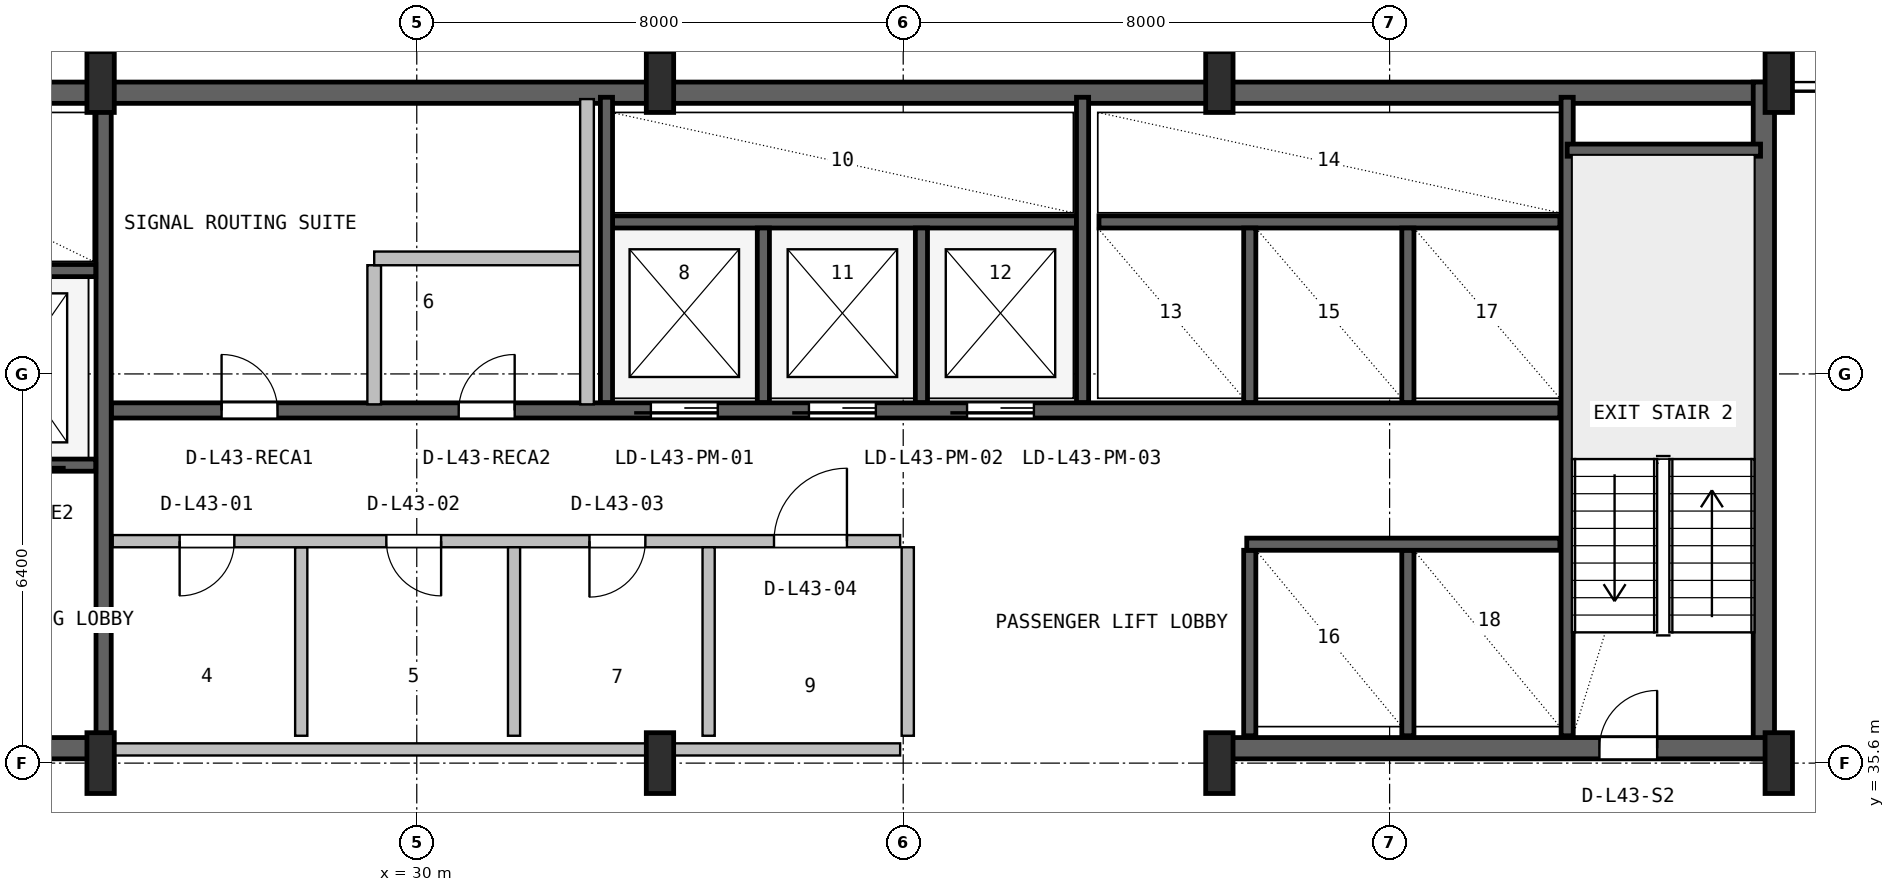
"""IFC4 building model, lengths in metres.
Left out: names, types, materials, properties, quantities, classifications, styles, units other than length and angle.
Written with IfcOpenShell. Run it as: python <this file> out.ifc"""

import sys

from ifc_helpers import new_model, si_unit, direction, frame, frame_2d, origin, origin_2d, place, context, subcontext, project, spatial, rectangle, i_section, extrude, source, transform, mapped, element, fill, save


model = new_model("IFC4")
c1 = context("Model", 3, precision=1e-05, world=origin(), true_north=direction((0.0, 1.0)))
c2 = subcontext(c1, "Body", "Model", "MODEL_VIEW")
j1 = project(units=[si_unit("LENGTHUNIT", "METRE"), si_unit("PLANEANGLEUNIT", "RADIAN")], contexts=[c1])
p1 = place(None, origin())
s1 = spatial("IfcSite", under=j1, at=p1, CompositionType="ELEMENT")
p2 = place(p1, origin())
s2 = spatial("IfcBuilding", under=s1, at=p2, CompositionType="ELEMENT")
p3 = place(p2, frame((0.0, 0.0, 176.2)))
s3 = spatial("IfcBuildingStorey", under=s2, at=p3, CompositionType="ELEMENT", Elevation=176.2)
p4 = place(p3, frame((15.6, 46.625, 0.0), z_axis=(0.0, 0.0, 1.0), x_axis=(1.0, 0.0, 0.0)))
e1 = element("IfcWall", 1, at=p4, inside=s3, PredefinedType="SHEAR", context=c2, shape_type="SweptSolid", body=[
    extrude(rectangle(XDim=36.8, YDim=0.35, at=frame_2d((18.4, 0.0))), origin(), (0.0, 0.0, 1.0), 3.55),
])
p5 = place(p3, frame((52.155, 35.67, 0.0), z_axis=(0.0, 0.0, 1.0), x_axis=(0.0, 1.0, 0.0)))
e2 = element("IfcWall", 2, at=p5, inside=s3, PredefinedType="SHEAR", context=c2, shape_type="SweptSolid", body=[
    extrude(rectangle(XDim=11.13, YDim=0.35, at=frame_2d((5.565, 0.0))), origin(), (0.0, 0.0, 1.0), 3.55),
])
p6 = place(p3, frame((15.67, 35.845, 0.0), z_axis=(0.0, 0.0, 1.0), x_axis=(1.0, 0.0, 0.0)))
e3 = element("IfcWall", 3, at=p6, inside=s3, PredefinedType="SHEAR", context=c2, shape_type="SweptSolid", body=[
    extrude(rectangle(XDim=9.13, YDim=0.35, at=frame_2d((4.565, 0.0))), origin(), (0.0, 0.0, 1.0), 3.55),
])
p7 = place(p6, frame((5.4, 0.0, 0.0)))
e4 = element("IfcOpeningElement", 4, at=p7, cuts=e3, PredefinedType="OPENING", context=c2, shape_type="SweptSolid", body=[
    extrude(rectangle(XDim=1.0, YDim=2.1, at=frame_2d((0.5, 1.05))), frame((0.0, 0.185, 0.0), z_axis=(0.0, -1.0, 0.0), x_axis=(1.0, 0.0, 0.0)), (0.0, 0.0, 1.0), 0.37),
])
p8 = place(p3, frame((43.2, 35.845, 0.0), z_axis=(0.0, 0.0, 1.0), x_axis=(1.0, 0.0, 0.0)))
e5 = element("IfcWall", 5, at=p8, inside=s3, PredefinedType="SHEAR", context=c2, shape_type="SweptSolid", body=[
    extrude(rectangle(XDim=9.13, YDim=0.35, at=frame_2d((4.565, 0.0))), origin(), (0.0, 0.0, 1.0), 3.55),
])
p9 = place(p8, frame((6.25, 0.0, 0.0)))
e6 = element("IfcOpeningElement", 6, at=p9, cuts=e5, PredefinedType="OPENING", context=c2, shape_type="SweptSolid", body=[
    extrude(rectangle(XDim=0.95, YDim=2.1, at=frame_2d((0.475, 1.05))), frame((0.0, 0.185, 0.0), z_axis=(0.0, -1.0, 0.0), x_axis=(1.0, 0.0, 0.0)), (0.0, 0.0, 1.0), 0.37),
])
m1 = source(origin(), c2, "Body", "SweptSolid", [
    extrude(i_section(OverallWidth=0.45, OverallDepth=1.0, WebThickness=0.016, FlangeThickness=0.03, FilletRadius=0.016, at=origin_2d()), origin(), (0.0, 0.0, 1.0), 3.8),
])
for number, where, z_axis, x_axis in (
    (7, (24.8, 35.6, 0.0), (0.0, 0.0, 1.0), (1.0, 0.0, 0.0)),
    (8, (24.8, 46.8, 0.0), (0.0, 0.0, 1.0), (1.0, 0.0, 0.0)),
    (9, (34.0, 35.6, 0.0), (0.0, 0.0, 1.0), (1.0, 0.0, 0.0)),
    (10, (34.0, 46.8, 0.0), (0.0, 0.0, 1.0), (1.0, 0.0, 0.0)),
    (11, (43.2, 35.6, 0.0), (0.0, 0.0, 1.0), (1.0, 0.0, 0.0)),
    (12, (43.2, 46.8, 0.0), (0.0, 0.0, 1.0), (1.0, 0.0, 0.0)),
    (13, (52.4, 35.6, 0.0), (0.0, 0.0, 1.0), (1.0, 0.0, 0.0)),
    (14, (52.4, 46.8, 0.0), (0.0, 0.0, 1.0), (1.0, 0.0, 0.0)),
):
    element("IfcColumn", number, at=place(p3, frame(where, z_axis=z_axis, x_axis=x_axis)), inside=s3, PredefinedType="COLUMN", context=c2, shape_type="MappedRepresentation", body=[
        mapped(m1, transform((0.0, 0.0, 0.0), x_axis=(1.0, 0.0, 0.0), y_axis=(0.0, 1.0, 0.0), z_axis=(0.0, 0.0, 1.0), scale=1.0)),
    ])
p10 = place(p3, frame((24.85, 36.05, 0.0), z_axis=(0.0, 0.0, 1.0), x_axis=(0.0, 1.0, 0.0)))
e15 = element("IfcWall", 15, at=p10, inside=s3, PredefinedType="SHEAR", context=c2, shape_type="SweptSolid", body=[
    extrude(rectangle(XDim=10.45, YDim=0.25, at=frame_2d((5.225, 0.0))), origin(), (0.0, 0.0, 1.0), 3.55),
])
p11 = place(p3, frame((19.2, 40.5, 0.0), z_axis=(0.0, 0.0, 1.0), x_axis=(1.0, 0.0, 0.0)))
e16 = element("IfcWall", 16, at=p11, inside=s3, PredefinedType="SHEAR", context=c2, shape_type="SweptSolid", body=[
    extrude(rectangle(XDim=5.52, YDim=0.2, at=frame_2d((2.76, 0.0))), origin(), (0.0, 0.0, 1.0), 3.55),
])
p12 = place(p11, frame((1.05, 0.0, 0.0)))
e17 = element("IfcOpeningElement", 17, at=p12, cuts=e16, PredefinedType="OPENING", context=c2, shape_type="SweptSolid", body=[
    extrude(rectangle(XDim=1.1, YDim=2.18, at=frame_2d((0.55, 1.09))), frame((0.0, 0.11, 0.0), z_axis=(0.0, -1.0, 0.0), x_axis=(1.0, 0.0, 0.0)), (0.0, 0.0, 1.0), 0.22),
])
p13 = place(p11, frame((3.65, 0.0, 0.0)))
e18 = element("IfcOpeningElement", 18, at=p13, cuts=e16, PredefinedType="OPENING", context=c2, shape_type="SweptSolid", body=[
    extrude(rectangle(XDim=1.1, YDim=2.18, at=frame_2d((0.55, 1.09))), frame((0.0, 0.11, 0.0), z_axis=(0.0, -1.0, 0.0), x_axis=(1.0, 0.0, 0.0)), (0.0, 0.0, 1.0), 0.22),
])
p14 = place(p3, frame((19.2, 43.7, 0.0), z_axis=(0.0, 0.0, 1.0), x_axis=(1.0, 0.0, 0.0)))
e19 = element("IfcWall", 19, at=p14, inside=s3, PredefinedType="SHEAR", context=c2, shape_type="SweptSolid", body=[
    extrude(rectangle(XDim=5.52, YDim=0.2, at=frame_2d((2.76, 0.0))), origin(), (0.0, 0.0, 1.0), 3.55),
])
p15 = place(p3, frame((48.92, 36.05, 0.0), z_axis=(0.0, 0.0, 1.0), x_axis=(0.0, 1.0, 0.0)))
e20 = element("IfcWall", 20, at=p15, inside=s3, PredefinedType="SHEAR", context=c2, shape_type="SweptSolid", body=[
    extrude(rectangle(XDim=10.5, YDim=0.2, at=frame_2d((5.25, 0.0))), origin(), (0.0, 0.0, 1.0), 3.55),
])
p16 = place(p3, frame((48.92, 45.68, 0.0), z_axis=(0.0, 0.0, 1.0), x_axis=(1.0, 0.0, 0.0)))
e21 = element("IfcWall", 21, at=p16, inside=s3, PredefinedType="SHEAR", context=c2, shape_type="SweptSolid", body=[
    extrude(rectangle(XDim=3.18, YDim=0.2, at=frame_2d((1.59, 0.0))), origin(), (0.0, 0.0, 1.0), 3.55),
])
p17 = place(p3, frame((24.98, 41.4, 0.0), z_axis=(0.0, 0.0, 1.0), x_axis=(1.0, 0.0, 0.0)))
e22 = element("IfcWall", 22, at=p17, inside=s3, PredefinedType="SHEAR", context=c2, shape_type="SweptSolid", body=[
    extrude(rectangle(XDim=23.82, YDim=0.25, at=frame_2d((11.91, 0.0))), origin(), (0.0, 0.0, 1.0), 3.55),
])
p18 = place(p17, frame((8.87, 0.0, 0.0)))
e23 = element("IfcOpeningElement", 23, at=p18, cuts=e22, PredefinedType="OPENING", context=c2, shape_type="SweptSolid", body=[
    extrude(rectangle(XDim=1.1, YDim=2.18, at=frame_2d((0.55, 1.09))), frame((0.0, 0.135, 0.0), z_axis=(0.0, -1.0, 0.0), x_axis=(1.0, 0.0, 0.0)), (0.0, 0.0, 1.0), 0.27),
])
p19 = place(p17, frame((11.47, 0.0, 0.0)))
e24 = element("IfcOpeningElement", 24, at=p19, cuts=e22, PredefinedType="OPENING", context=c2, shape_type="SweptSolid", body=[
    extrude(rectangle(XDim=1.1, YDim=2.18, at=frame_2d((0.55, 1.09))), frame((0.0, 0.135, 0.0), z_axis=(0.0, -1.0, 0.0), x_axis=(1.0, 0.0, 0.0)), (0.0, 0.0, 1.0), 0.27),
])
p20 = place(p17, frame((14.07, 0.0, 0.0)))
e25 = element("IfcOpeningElement", 25, at=p20, cuts=e22, PredefinedType="OPENING", context=c2, shape_type="SweptSolid", body=[
    extrude(rectangle(XDim=1.1, YDim=2.18, at=frame_2d((0.55, 1.09))), frame((0.0, 0.135, 0.0), z_axis=(0.0, -1.0, 0.0), x_axis=(1.0, 0.0, 0.0)), (0.0, 0.0, 1.0), 0.27),
])
p21 = place(p17, frame((1.81, 0.0, 0.0)))
e26 = element("IfcOpeningElement", 26, at=p21, cuts=e22, PredefinedType="OPENING", context=c2, shape_type="SweptSolid", body=[
    extrude(rectangle(XDim=0.92, YDim=2.08, at=frame_2d((0.46, 1.04))), frame((0.0, 0.135, 0.0), z_axis=(0.0, -1.0, 0.0), x_axis=(1.0, 0.0, 0.0)), (0.0, 0.0, 1.0), 0.27),
])
p22 = place(p17, frame((5.71, 0.0, 0.0)))
e27 = element("IfcOpeningElement", 27, at=p22, cuts=e22, PredefinedType="OPENING", context=c2, shape_type="SweptSolid", body=[
    extrude(rectangle(XDim=0.92, YDim=2.08, at=frame_2d((0.46, 1.04))), frame((0.0, 0.135, 0.0), z_axis=(0.0, -1.0, 0.0), x_axis=(1.0, 0.0, 0.0)), (0.0, 0.0, 1.0), 0.27),
])
p23 = place(p3, frame((33.22, 44.5, 0.0), z_axis=(0.0, 0.0, 1.0), x_axis=(1.0, 0.0, 0.0)))
e28 = element("IfcWall", 28, at=p23, inside=s3, PredefinedType="SHEAR", context=c2, shape_type="SweptSolid", body=[
    extrude(rectangle(XDim=7.63, YDim=0.2, at=frame_2d((3.815, 0.0))), origin(), (0.0, 0.0, 1.0), 3.55),
])
p24 = place(p3, frame((33.12, 41.53, 0.0), z_axis=(0.0, 0.0, 1.0), x_axis=(0.0, 1.0, 0.0)))
e29 = element("IfcWall", 29, at=p24, inside=s3, PredefinedType="SHEAR", context=c2, shape_type="SweptSolid", body=[
    extrude(rectangle(XDim=5.02, YDim=0.2, at=frame_2d((2.51, 0.0))), origin(), (0.0, 0.0, 1.0), 3.55),
])
for number, where, z_axis, x_axis in (
    (30, (35.7, 41.53, 0.0), (0.0, 0.0, 1.0), (0.0, 1.0, 0.0)),
    (31, (38.3, 41.53, 0.0), (0.0, 0.0, 1.0), (0.0, 1.0, 0.0)),
):
    element("IfcWall", number, at=place(p3, frame(where, z_axis=z_axis, x_axis=x_axis)), inside=s3, PredefinedType="SHEAR", context=c2, shape_type="SweptSolid", body=[
        extrude(rectangle(XDim=2.87, YDim=0.2, at=frame_2d((1.435, 0.0))), origin(), (0.0, 0.0, 1.0), 3.55),
    ])
p25 = place(p3, frame((40.95, 41.53, 0.0), z_axis=(0.0, 0.0, 1.0), x_axis=(0.0, 1.0, 0.0)))
e32 = element("IfcWall", 32, at=p25, inside=s3, PredefinedType="SHEAR", context=c2, shape_type="SweptSolid", body=[
    extrude(rectangle(XDim=5.02, YDim=0.2, at=frame_2d((2.51, 0.0))), origin(), (0.0, 0.0, 1.0), 3.55),
])
p26 = place(p3, frame((41.22, 44.5, 0.0), z_axis=(0.0, 0.0, 1.0), x_axis=(1.0, 0.0, 0.0)))
e33 = element("IfcWall", 33, at=p26, inside=s3, PredefinedType="SHEAR", context=c2, shape_type="SweptSolid", body=[
    extrude(rectangle(XDim=7.58, YDim=0.2, at=frame_2d((3.79, 0.0))), origin(), (0.0, 0.0, 1.0), 3.55),
])
for number, where, z_axis, x_axis in (
    (34, (43.7, 41.53, 0.0), (0.0, 0.0, 1.0), (0.0, 1.0, 0.0)),
    (35, (46.3, 41.53, 0.0), (0.0, 0.0, 1.0), (0.0, 1.0, 0.0)),
):
    element("IfcWall", number, at=place(p3, frame(where, z_axis=z_axis, x_axis=x_axis)), inside=s3, PredefinedType="SHEAR", context=c2, shape_type="SweptSolid", body=[
        extrude(rectangle(XDim=2.87, YDim=0.2, at=frame_2d((1.435, 0.0))), origin(), (0.0, 0.0, 1.0), 3.55),
    ])
for number, where, z_axis, x_axis in (
    (36, (43.7, 36.05, 0.0), (0.0, 0.0, 1.0), (0.0, 1.0, 0.0)),
    (37, (46.3, 36.05, 0.0), (0.0, 0.0, 1.0), (0.0, 1.0, 0.0)),
):
    element("IfcWall", number, at=place(p3, frame(where, z_axis=z_axis, x_axis=x_axis)), inside=s3, PredefinedType="SHEAR", context=c2, shape_type="SweptSolid", body=[
        extrude(rectangle(XDim=3.05, YDim=0.2, at=frame_2d((1.525, 0.0))), origin(), (0.0, 0.0, 1.0), 3.55),
    ])
p27 = place(p3, frame((43.65, 39.2, 0.0), z_axis=(0.0, 0.0, 1.0), x_axis=(1.0, 0.0, 0.0)))
e38 = element("IfcWall", 38, at=p27, inside=s3, PredefinedType="SHEAR", context=c2, shape_type="SweptSolid", body=[
    extrude(rectangle(XDim=5.15, YDim=0.2, at=frame_2d((2.575, 0.0))), origin(), (0.0, 0.0, 1.0), 3.55),
])
p28 = place(p3, frame((25.0, 35.825, 0.0), z_axis=(0.0, 0.0, 1.0), x_axis=(1.0, 0.0, 0.0)))
e39 = element("IfcWall", 39, at=p28, inside=s3, PredefinedType="SOLIDWALL", context=c2, shape_type="SweptSolid", body=[
    extrude(rectangle(XDim=12.95, YDim=0.2, at=frame_2d((6.475, 0.0))), origin(), (0.0, 0.0, 1.0), 2.575),
])
p29 = place(p3, frame((28.1, 36.05, 0.0), z_axis=(0.0, 0.0, 1.0), x_axis=(0.0, 1.0, 0.0)))
e40 = element("IfcWall", 40, at=p29, inside=s3, PredefinedType="PLUMBINGWALL", context=c2, shape_type="SweptSolid", body=[
    extrude(rectangle(XDim=3.1, YDim=0.2, at=frame_2d((1.55, 0.0))), origin(), (0.0, 0.0, 1.0), 3.53),
])
p30 = place(p3, frame((25.0, 39.25, 0.0), z_axis=(0.0, 0.0, 1.0), x_axis=(1.0, 0.0, 0.0)))
e41 = element("IfcWall", 41, at=p30, inside=s3, PredefinedType="SOLIDWALL", context=c2, shape_type="SweptSolid", body=[
    extrude(rectangle(XDim=12.95, YDim=0.2, at=frame_2d((6.475, 0.0))), origin(), (0.0, 0.0, 1.0), 3.53),
])
p31 = place(p30, frame((1.1, 0.0, 0.0)))
e42 = element("IfcOpeningElement", 42, at=p31, cuts=e41, PredefinedType="OPENING", context=c2, shape_type="SweptSolid", body=[
    extrude(rectangle(XDim=0.9, YDim=2.06, at=frame_2d((0.45, 1.03))), frame((0.0, 0.11, 0.0), z_axis=(0.0, -1.0, 0.0), x_axis=(1.0, 0.0, 0.0)), (0.0, 0.0, 1.0), 0.22),
])
p32 = place(p30, frame((4.5, 0.0, 0.0)))
e43 = element("IfcOpeningElement", 43, at=p32, cuts=e41, PredefinedType="OPENING", context=c2, shape_type="SweptSolid", body=[
    extrude(rectangle(XDim=0.9, YDim=2.06, at=frame_2d((0.45, 1.03))), frame((0.0, 0.11, 0.0), z_axis=(0.0, -1.0, 0.0), x_axis=(1.0, 0.0, 0.0)), (0.0, 0.0, 1.0), 0.22),
])
p33 = place(p30, frame((7.84, 0.0, 0.0)))
e44 = element("IfcOpeningElement", 44, at=p33, cuts=e41, PredefinedType="OPENING", context=c2, shape_type="SweptSolid", body=[
    extrude(rectangle(XDim=0.92, YDim=2.08, at=frame_2d((0.46, 1.04))), frame((0.0, 0.11, 0.0), z_axis=(0.0, -1.0, 0.0), x_axis=(1.0, 0.0, 0.0)), (0.0, 0.0, 1.0), 0.22),
])
p34 = place(p30, frame((10.875, 0.0, 0.0)))
e45 = element("IfcOpeningElement", 45, at=p34, cuts=e41, PredefinedType="OPENING", context=c2, shape_type="SweptSolid", body=[
    extrude(rectangle(XDim=1.2, YDim=2.1, at=frame_2d((0.6, 1.05))), frame((0.0, 0.11, 0.0), z_axis=(0.0, -1.0, 0.0), x_axis=(1.0, 0.0, 0.0)), (0.0, 0.0, 1.0), 0.22),
])
p35 = place(p3, frame((31.6, 36.05, 0.0), z_axis=(0.0, 0.0, 1.0), x_axis=(0.0, 1.0, 0.0)))
e46 = element("IfcWall", 46, at=p35, inside=s3, PredefinedType="PLUMBINGWALL", context=c2, shape_type="SweptSolid", body=[
    extrude(rectangle(XDim=3.1, YDim=0.2, at=frame_2d((1.55, 0.0))), origin(), (0.0, 0.0, 1.0), 3.53),
])
for number, where, z_axis, x_axis in (
    (47, (34.8, 36.05, 0.0), (0.0, 0.0, 1.0), (0.0, 1.0, 0.0)),
    (48, (38.075, 36.05, 0.0), (0.0, 0.0, 1.0), (0.0, 1.0, 0.0)),
):
    element("IfcWall", number, at=place(p3, frame(where, z_axis=z_axis, x_axis=x_axis)), inside=s3, PredefinedType="SOLIDWALL", context=c2, shape_type="SweptSolid", body=[
        extrude(rectangle(XDim=3.1, YDim=0.2, at=frame_2d((1.55, 0.0))), origin(), (0.0, 0.0, 1.0), 3.53),
    ])
p36 = place(p3, frame((29.3, 41.5, 0.0), z_axis=(0.0, 0.0, 1.0), x_axis=(0.0, 1.0, 0.0)))
e49 = element("IfcWall", 49, at=p36, inside=s3, PredefinedType="PARTITIONING", context=c2, shape_type="SweptSolid", body=[
    extrude(rectangle(XDim=2.288, YDim=0.225, at=frame_2d((1.144, 0.0))), origin(), (0.0, 0.0, 1.0), 3.53),
])
p37 = place(p3, frame((29.3, 43.9, 0.0), z_axis=(0.0, 0.0, 1.0), x_axis=(1.0, 0.0, 0.0)))
e50 = element("IfcWall", 50, at=p37, inside=s3, PredefinedType="PARTITIONING", context=c2, shape_type="SweptSolid", body=[
    extrude(rectangle(XDim=3.5, YDim=0.225, at=frame_2d((1.75, 0.0))), origin(), (0.0, 0.0, 1.0), 3.53),
])
p38 = place(p3, frame((32.8, 41.5, 0.0), z_axis=(0.0, 0.0, 1.0), x_axis=(0.0, 1.0, 0.0)))
e51 = element("IfcWall", 51, at=p38, inside=s3, PredefinedType="PARTITIONING", context=c2, shape_type="SweptSolid", body=[
    extrude(rectangle(XDim=5.02, YDim=0.225, at=frame_2d((2.51, 0.0))), origin(), (0.0, 0.0, 1.0), 3.53),
])
m2 = source(origin(), c2, "Body", "SweptSolid", [
    extrude(rectangle(XDim=0.95, YDim=2.1, at=frame_2d((0.475, 1.05))), frame((0.0, 0.025, 0.0), z_axis=(0.0, -1.0, 0.0), x_axis=(1.0, 0.0, 0.0)), (0.0, 0.0, 1.0), 0.05),
])
p39 = place(p9, origin())
e52 = element("IfcDoor", 52, at=p39, inside=s3, OperationType="SINGLE_SWING_RIGHT", PredefinedType="DOOR", context=c2, shape_type="MappedRepresentation", body=[
    mapped(m2, transform((0.0, 0.0, 0.0), x_axis=(1.0, 0.0, 0.0), y_axis=(0.0, 1.0, 0.0), z_axis=(0.0, 0.0, 1.0), scale=1.0)),
])
fill(e6, e52)
m3 = source(origin(), c2, "Body", "SweptSolid", [
    extrude(rectangle(XDim=1.1, YDim=2.18, at=frame_2d((0.55, 1.09))), frame((0.0, 0.025, 0.0), z_axis=(0.0, -1.0, 0.0), x_axis=(1.0, 0.0, 0.0)), (0.0, 0.0, 1.0), 0.05),
])
p40 = place(p18, frame((1.1, 0.0, 0.0), z_axis=(0.0, 0.0, 1.0), x_axis=(-1.0, 0.0, 0.0)))
e53 = element("IfcDoor", 53, at=p40, inside=s3, OperationType="SLIDING_TO_LEFT", PredefinedType="DOOR", context=c2, shape_type="MappedRepresentation", body=[
    mapped(m3, transform((0.0, 0.0, 0.0), x_axis=(1.0, 0.0, 0.0), y_axis=(0.0, 1.0, 0.0), z_axis=(0.0, 0.0, 1.0), scale=1.0)),
])
fill(e23, e53)
p41 = place(p19, frame((1.1, 0.0, 0.0), z_axis=(0.0, 0.0, 1.0), x_axis=(-1.0, 0.0, 0.0)))
e54 = element("IfcDoor", 54, at=p41, inside=s3, OperationType="SLIDING_TO_LEFT", PredefinedType="DOOR", context=c2, shape_type="MappedRepresentation", body=[
    mapped(m3, transform((0.0, 0.0, 0.0), x_axis=(1.0, 0.0, 0.0), y_axis=(0.0, 1.0, 0.0), z_axis=(0.0, 0.0, 1.0), scale=1.0)),
])
fill(e24, e54)
p42 = place(p20, frame((1.1, 0.0, 0.0), z_axis=(0.0, 0.0, 1.0), x_axis=(-1.0, 0.0, 0.0)))
e55 = element("IfcDoor", 55, at=p42, inside=s3, OperationType="SLIDING_TO_LEFT", PredefinedType="DOOR", context=c2, shape_type="MappedRepresentation", body=[
    mapped(m3, transform((0.0, 0.0, 0.0), x_axis=(1.0, 0.0, 0.0), y_axis=(0.0, 1.0, 0.0), z_axis=(0.0, 0.0, 1.0), scale=1.0)),
])
fill(e25, e55)
m4 = source(origin(), c2, "Body", "SweptSolid", [
    extrude(rectangle(XDim=0.92, YDim=2.08, at=frame_2d((0.46, 1.04))), frame((0.0, 0.025, 0.0), z_axis=(0.0, -1.0, 0.0), x_axis=(1.0, 0.0, 0.0)), (0.0, 0.0, 1.0), 0.05),
])
p43 = place(p21, origin())
e56 = element("IfcDoor", 56, at=p43, inside=s3, OperationType="SINGLE_SWING_LEFT", PredefinedType="DOOR", context=c2, shape_type="MappedRepresentation", body=[
    mapped(m4, transform((0.0, 0.0, 0.0), x_axis=(1.0, 0.0, 0.0), y_axis=(0.0, 1.0, 0.0), z_axis=(0.0, 0.0, 1.0), scale=1.0)),
])
fill(e26, e56)
p44 = place(p22, origin())
e57 = element("IfcDoor", 57, at=p44, inside=s3, OperationType="SINGLE_SWING_RIGHT", PredefinedType="DOOR", context=c2, shape_type="MappedRepresentation", body=[
    mapped(m4, transform((0.0, 0.0, 0.0), x_axis=(1.0, 0.0, 0.0), y_axis=(0.0, 1.0, 0.0), z_axis=(0.0, 0.0, 1.0), scale=1.0)),
])
fill(e27, e57)
m5 = source(origin(), c2, "Body", "SweptSolid", [
    extrude(rectangle(XDim=0.9, YDim=2.06, at=frame_2d((0.45, 1.03))), frame((0.0, 0.025, 0.0), z_axis=(0.0, -1.0, 0.0), x_axis=(1.0, 0.0, 0.0)), (0.0, 0.0, 1.0), 0.05),
])
p45 = place(p31, frame((0.9, 0.0, 0.0), z_axis=(0.0, 0.0, 1.0), x_axis=(-1.0, 0.0, 0.0)))
e58 = element("IfcDoor", 58, at=p45, inside=s3, OperationType="SINGLE_SWING_LEFT", PredefinedType="DOOR", context=c2, shape_type="MappedRepresentation", body=[
    mapped(m5, transform((0.0, 0.0, 0.0), x_axis=(1.0, 0.0, 0.0), y_axis=(0.0, 1.0, 0.0), z_axis=(0.0, 0.0, 1.0), scale=1.0)),
])
fill(e42, e58)
p46 = place(p32, frame((0.9, 0.0, 0.0), z_axis=(0.0, 0.0, 1.0), x_axis=(-1.0, 0.0, 0.0)))
e59 = element("IfcDoor", 59, at=p46, inside=s3, OperationType="SINGLE_SWING_RIGHT", PredefinedType="DOOR", context=c2, shape_type="MappedRepresentation", body=[
    mapped(m5, transform((0.0, 0.0, 0.0), x_axis=(1.0, 0.0, 0.0), y_axis=(0.0, 1.0, 0.0), z_axis=(0.0, 0.0, 1.0), scale=1.0)),
])
fill(e43, e59)
p47 = place(p33, frame((0.92, 0.0, 0.0), z_axis=(0.0, 0.0, 1.0), x_axis=(-1.0, 0.0, 0.0)))
e60 = element("IfcDoor", 60, at=p47, inside=s3, OperationType="SINGLE_SWING_LEFT", PredefinedType="DOOR", context=c2, shape_type="MappedRepresentation", body=[
    mapped(m4, transform((0.0, 0.0, 0.0), x_axis=(1.0, 0.0, 0.0), y_axis=(0.0, 1.0, 0.0), z_axis=(0.0, 0.0, 1.0), scale=1.0)),
])
fill(e44, e60)
m6 = source(origin(), c2, "Body", "SweptSolid", [
    extrude(rectangle(XDim=1.2, YDim=2.1, at=frame_2d((0.6, 1.05))), frame((0.0, 0.025, 0.0), z_axis=(0.0, -1.0, 0.0), x_axis=(1.0, 0.0, 0.0)), (0.0, 0.0, 1.0), 0.05),
])
p48 = place(p34, origin())
e61 = element("IfcDoor", 61, at=p48, inside=s3, OperationType="SINGLE_SWING_RIGHT", PredefinedType="DOOR", context=c2, shape_type="MappedRepresentation", body=[
    mapped(m6, transform((0.0, 0.0, 0.0), x_axis=(1.0, 0.0, 0.0), y_axis=(0.0, 1.0, 0.0), z_axis=(0.0, 0.0, 1.0), scale=1.0)),
])
fill(e45, e61)
save(model, sys.argv[1])
